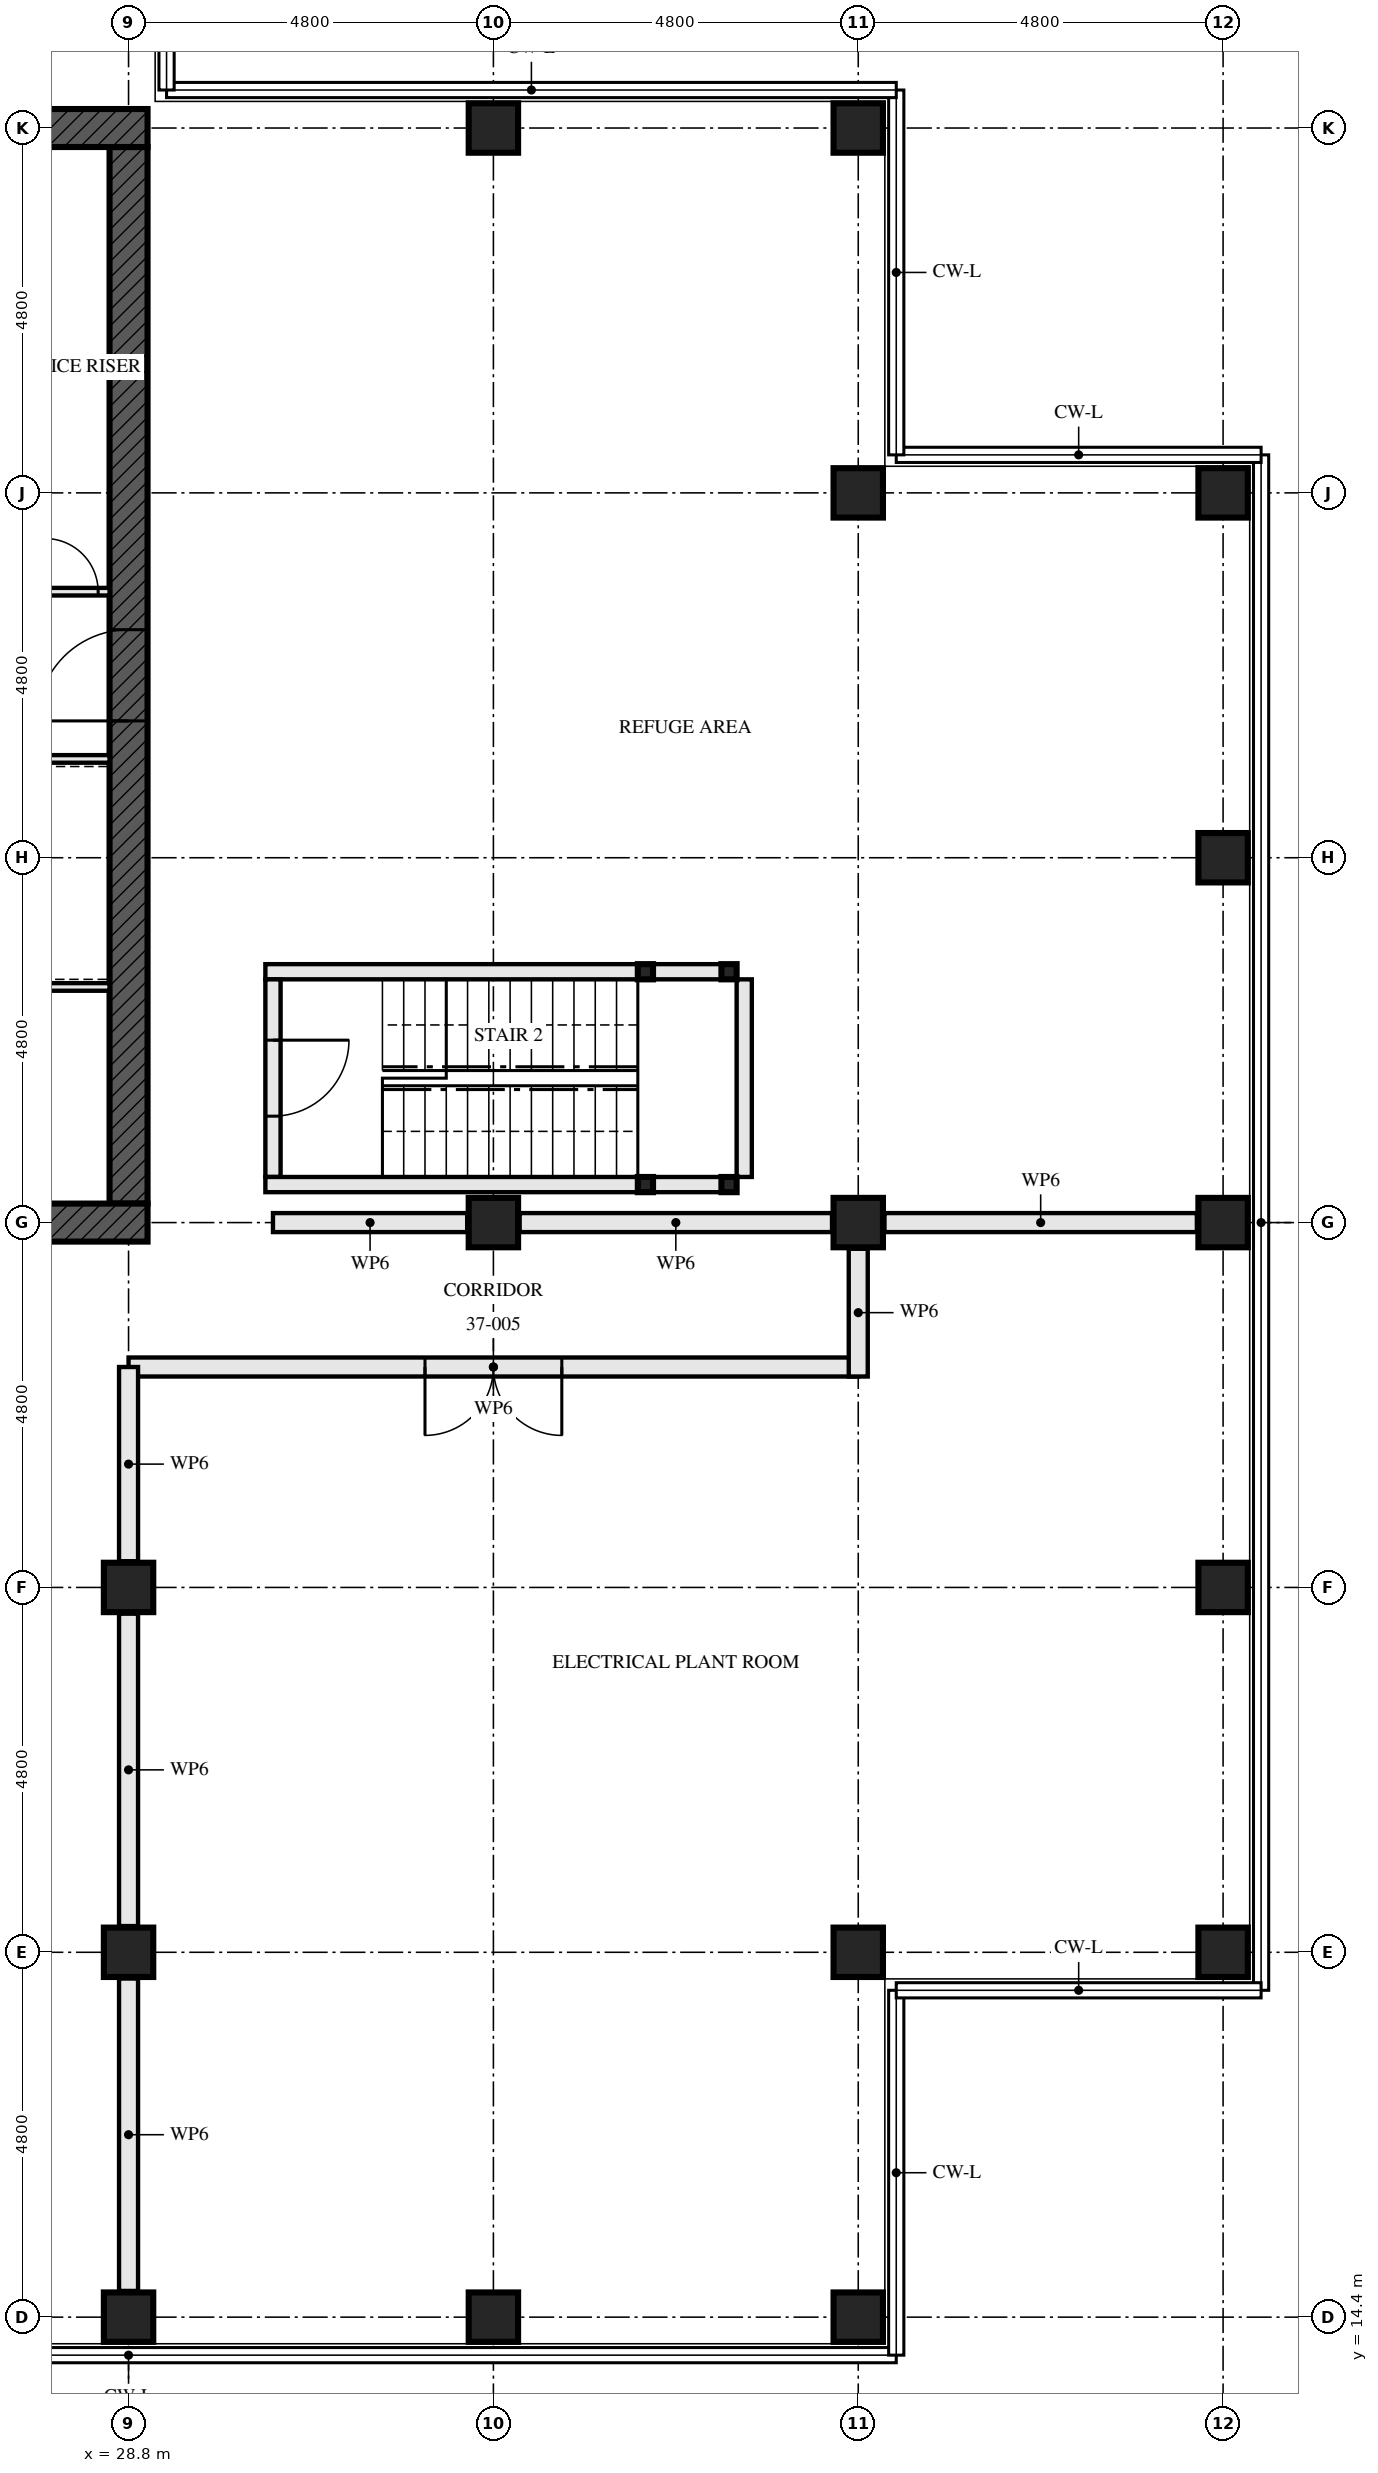
"""IFC4 building model, lengths in metres.
Left out: names, types, materials, properties, quantities, classifications, styles, units other than length and angle.
Written with IfcOpenShell. Run it as: python <this file> out.ifc"""

import sys

from ifc_helpers import new_model, si_unit, direction, frame, frame_2d, origin, origin_2d, place, context, subcontext, project, spatial, rectangle, hollow_rectangle, extrude, element, fill, save


model = new_model("IFC4")
c1 = context("Model", 3, precision=1e-05, world=origin(), true_north=direction((0.0, 1.0)))
c2 = subcontext(c1, "Body", "Model", "MODEL_VIEW")
j1 = project(units=[si_unit("LENGTHUNIT", "METRE"), si_unit("PLANEANGLEUNIT", "RADIAN")], contexts=[c1])
p1 = place(None, origin())
s1 = spatial("IfcSite", under=j1, at=p1, CompositionType="ELEMENT")
p2 = place(p1, origin())
s2 = spatial("IfcBuilding", under=s1, at=p2, CompositionType="ELEMENT")
p3 = place(p2, frame((0.0, 0.0, 136.5)))
s3 = spatial("IfcBuildingStorey", under=s2, at=p3, CompositionType="ELEMENT", Elevation=136.5)
p4 = place(p3, frame((28.8, 14.4, 0.0), z_axis=(0.0, 0.0, 1.0), x_axis=(0.0, 1.0, 0.0)))
e1 = element("IfcColumn", 1, at=p4, inside=s3, PredefinedType="COLUMN", context=c2, shape_type="SweptSolid", body=[
    extrude(hollow_rectangle(XDim=0.65, YDim=0.65, WallThickness=0.08, at=origin_2d()), origin(), (0.0, 0.0, 1.0), 4.33),
])
for number, where, z_axis, x_axis in (
    (2, (28.8, 19.2, 0.0), (0.0, 0.0, 1.0), (1.0, 0.0, 0.0)),
    (3, (28.8, 24.0, 0.0), (0.0, 0.0, 1.0), (1.0, 0.0, 0.0)),
):
    element("IfcColumn", number, at=place(p3, frame(where, z_axis=z_axis, x_axis=x_axis)), inside=s3, PredefinedType="COLUMN", context=c2, shape_type="SweptSolid", body=[
        extrude(hollow_rectangle(XDim=0.65, YDim=0.65, WallThickness=0.05, at=origin_2d()), origin(), (0.0, 0.0, 1.0), 4.5),
    ])
p5 = place(p3, frame((33.6, 14.4, 0.0), z_axis=(0.0, 0.0, 1.0), x_axis=(0.0, 1.0, 0.0)))
e4 = element("IfcColumn", 4, at=p5, inside=s3, PredefinedType="COLUMN", context=c2, shape_type="SweptSolid", body=[
    extrude(hollow_rectangle(XDim=0.65, YDim=0.65, WallThickness=0.08, at=origin_2d()), origin(), (0.0, 0.0, 1.0), 4.33),
])
p6 = place(p3, frame((33.6, 28.8, 0.0), z_axis=(0.0, 0.0, 1.0), x_axis=(0.0, 1.0, 0.0)))
e5 = element("IfcColumn", 5, at=p6, inside=s3, PredefinedType="COLUMN", context=c2, shape_type="SweptSolid", body=[
    extrude(hollow_rectangle(XDim=0.65, YDim=0.65, WallThickness=0.05, at=origin_2d()), origin(), (0.0, 0.0, 1.0), 4.5),
])
p7 = place(p3, frame((33.6, 43.2, 0.0), z_axis=(0.0, 0.0, 1.0), x_axis=(0.0, 1.0, 0.0)))
e6 = element("IfcColumn", 6, at=p7, inside=s3, PredefinedType="COLUMN", context=c2, shape_type="SweptSolid", body=[
    extrude(hollow_rectangle(XDim=0.65, YDim=0.65, WallThickness=0.08, at=origin_2d()), origin(), (0.0, 0.0, 1.0), 4.5),
])
for number, where, z_axis, x_axis in (
    (7, (38.4, 14.4, 0.0), (0.0, 0.0, 1.0), (0.0, 1.0, 0.0)),
    (8, (38.4, 19.2, 0.0), (0.0, 0.0, 1.0), (0.0, 1.0, 0.0)),
):
    element("IfcColumn", number, at=place(p3, frame(where, z_axis=z_axis, x_axis=x_axis)), inside=s3, PredefinedType="COLUMN", context=c2, shape_type="SweptSolid", body=[
        extrude(hollow_rectangle(XDim=0.65, YDim=0.65, WallThickness=0.08, at=origin_2d()), origin(), (0.0, 0.0, 1.0), 4.33),
    ])
p8 = place(p3, frame((38.4, 28.8, 0.0), z_axis=(0.0, 0.0, 1.0), x_axis=(0.0, 1.0, 0.0)))
e9 = element("IfcColumn", 9, at=p8, inside=s3, PredefinedType="COLUMN", context=c2, shape_type="SweptSolid", body=[
    extrude(hollow_rectangle(XDim=0.65, YDim=0.65, WallThickness=0.05, at=origin_2d()), origin(), (0.0, 0.0, 1.0), 4.5),
])
for number, where, z_axis, x_axis in (
    (10, (38.4, 38.4, 0.0), (0.0, 0.0, 1.0), (0.0, 1.0, 0.0)),
    (11, (38.4, 43.2, 0.0), (0.0, 0.0, 1.0), (0.0, 1.0, 0.0)),
):
    element("IfcColumn", number, at=place(p3, frame(where, z_axis=z_axis, x_axis=x_axis)), inside=s3, PredefinedType="COLUMN", context=c2, shape_type="SweptSolid", body=[
        extrude(hollow_rectangle(XDim=0.65, YDim=0.65, WallThickness=0.08, at=origin_2d()), origin(), (0.0, 0.0, 1.0), 4.5),
    ])
for number, where, z_axis, x_axis in (
    (12, (43.2, 19.2, 0.0), (0.0, 0.0, 1.0), (0.0, 1.0, 0.0)),
    (13, (43.2, 24.0, 0.0), (0.0, 0.0, 1.0), (1.0, 0.0, 0.0)),
    (14, (43.2, 28.8, 0.0), (0.0, 0.0, 1.0), (0.0, 1.0, 0.0)),
):
    element("IfcColumn", number, at=place(p3, frame(where, z_axis=z_axis, x_axis=x_axis)), inside=s3, PredefinedType="COLUMN", context=c2, shape_type="SweptSolid", body=[
        extrude(hollow_rectangle(XDim=0.65, YDim=0.65, WallThickness=0.08, at=origin_2d()), origin(), (0.0, 0.0, 1.0), 4.33),
    ])
for number, where, z_axis, x_axis in (
    (15, (43.2, 33.6, 0.0), (0.0, 0.0, 1.0), (1.0, 0.0, 0.0)),
    (16, (43.2, 38.4, 0.0), (0.0, 0.0, 1.0), (0.0, 1.0, 0.0)),
):
    element("IfcColumn", number, at=place(p3, frame(where, z_axis=z_axis, x_axis=x_axis)), inside=s3, PredefinedType="COLUMN", context=c2, shape_type="SweptSolid", body=[
        extrude(hollow_rectangle(XDim=0.65, YDim=0.65, WallThickness=0.08, at=origin_2d()), origin(), (0.0, 0.0, 1.0), 4.5),
    ])
p9 = place(p3, frame((14.15, 28.8, -0.25), z_axis=(0.0, 0.0, 1.0), x_axis=(1.0, 0.0, 0.0)))
e17 = element("IfcWall", 17, at=p9, inside=s3, PredefinedType="SHEAR", context=c2, shape_type="SweptSolid", body=[
    extrude(rectangle(XDim=14.9, YDim=0.5, at=frame_2d((7.45, 0.0))), origin(), (0.0, 0.0, 1.0), 4.58),
])
p10 = place(p9, frame((6.85, 0.0, 0.25)))
e18 = element("IfcOpeningElement", 18, at=p10, cuts=e17, PredefinedType="OPENING", context=c2, shape_type="SweptSolid", body=[
    extrude(rectangle(XDim=1.2, YDim=2.1, at=frame_2d((0.6, 1.05))), frame((0.0, 0.26, 0.0), z_axis=(0.0, -1.0, 0.0), x_axis=(1.0, 0.0, 0.0)), (0.0, 0.0, 1.0), 0.521),
])
p11 = place(p3, frame((29.05, 43.2, -0.25), z_axis=(0.0, 0.0, 1.0), x_axis=(-1.0, 0.0, 0.0)))
e19 = element("IfcWall", 19, at=p11, inside=s3, PredefinedType="SHEAR", context=c2, shape_type="SweptSolid", body=[
    extrude(rectangle(XDim=14.9, YDim=0.5, at=frame_2d((7.45, 0.0))), origin(), (0.0, 0.0, 1.0), 4.58),
])
p12 = place(p11, frame((6.85, 0.0, 0.25)))
e20 = element("IfcOpeningElement", 20, at=p12, cuts=e19, PredefinedType="OPENING", context=c2, shape_type="SweptSolid", body=[
    extrude(rectangle(XDim=1.2, YDim=2.1, at=frame_2d((0.6, 1.05))), frame((0.0, 0.26, 0.0), z_axis=(0.0, -1.0, 0.0), x_axis=(1.0, 0.0, 0.0)), (0.0, 0.0, 1.0), 0.521),
])
p13 = place(p3, frame((28.8, 29.05, -0.25), z_axis=(0.0, 0.0, 1.0), x_axis=(0.0, 1.0, 0.0)))
e21 = element("IfcWall", 21, at=p13, inside=s3, PredefinedType="SHEAR", context=c2, shape_type="SweptSolid", body=[
    extrude(rectangle(XDim=13.9, YDim=0.5, at=frame_2d((6.95, 0.0))), origin(), (0.0, 0.0, 1.0), 4.58),
])
p14 = place(p13, frame((6.35, 0.0, 0.25)))
e22 = element("IfcOpeningElement", 22, at=p14, cuts=e21, PredefinedType="OPENING", context=c2, shape_type="SweptSolid", body=[
    extrude(rectangle(XDim=1.2, YDim=2.1, at=frame_2d((0.6, 1.05))), frame((0.0, 0.26, 0.0), z_axis=(0.0, -1.0, 0.0), x_axis=(1.0, 0.0, 0.0)), (0.0, 0.0, 1.0), 0.521),
])
for number, where, z_axis, x_axis in (
    (23, (36.7, 29.3, 0.0), (0.0, 0.0, 1.0), (1.0, 0.0, 0.0)),
    (24, (36.7, 32.1, 0.0), (0.0, 0.0, 1.0), (1.0, 0.0, 0.0)),
    (25, (35.6, 29.3, 0.0), (0.0, 0.0, 1.0), (1.0, 0.0, 0.0)),
    (26, (35.6, 32.1, 0.0), (0.0, 0.0, 1.0), (1.0, 0.0, 0.0)),
):
    element("IfcColumn", number, at=place(p3, frame(where, z_axis=z_axis, x_axis=x_axis)), inside=s3, PredefinedType="COLUMN", context=c2, shape_type="SweptSolid", body=[
        extrude(hollow_rectangle(XDim=0.2, YDim=0.2, WallThickness=0.008, at=origin_2d()), origin(), (0.0, 0.0, 1.0), 4.33),
    ])
p15 = place(p3, frame((28.8, 26.9, 0.0), z_axis=(0.0, 0.0, 1.0), x_axis=(1.0, 0.0, 0.0)))
e27 = element("IfcWall", 27, at=p15, inside=s3, PredefinedType="SOLIDWALL", context=c2, shape_type="SweptSolid", body=[
    extrude(rectangle(XDim=9.6, YDim=0.25, at=frame_2d((4.8, 0.0))), origin(), (0.0, 0.0, 1.0), 4.33),
])
p16 = place(p15, frame((3.9, 0.0, 0.0)))
e28 = element("IfcOpeningElement", 28, at=p16, cuts=e27, PredefinedType="OPENING", context=c2, shape_type="SweptSolid", body=[
    extrude(rectangle(XDim=1.8, YDim=2.4, at=frame_2d((0.9, 1.2))), frame((0.0, 0.135, 0.0), z_axis=(0.0, -1.0, 0.0), x_axis=(1.0, 0.0, 0.0)), (0.0, 0.0, 1.0), 0.271),
])
p17 = place(p3, frame((38.4, 26.775, 0.0), z_axis=(0.0, 0.0, 1.0), x_axis=(0.0, 1.0, 0.0)))
e29 = element("IfcWall", 29, at=p17, inside=s3, PredefinedType="SOLIDWALL", context=c2, shape_type="SweptSolid", body=[
    extrude(rectangle(XDim=1.68, YDim=0.25, at=frame_2d((0.84, 0.0))), origin(), (0.0, 0.0, 1.0), 4.33),
])
p18 = place(p3, frame((36.6, 29.3, 0.0), z_axis=(0.0, 0.0, 1.0), x_axis=(-1.0, 0.0, 0.0)))
e30 = element("IfcWall", 30, at=p18, inside=s3, PredefinedType="SOLIDWALL", context=c2, shape_type="SweptSolid", body=[
    extrude(rectangle(XDim=0.9, YDim=0.2, at=frame_2d((0.45, 0.0))), origin(), (0.0, 0.0, 1.0), 3.99),
])
p19 = place(p3, frame((35.5, 29.3, 0.0), z_axis=(0.0, 0.0, 1.0), x_axis=(-1.0, 0.0, 0.0)))
e31 = element("IfcWall", 31, at=p19, inside=s3, PredefinedType="SOLIDWALL", context=c2, shape_type="SweptSolid", body=[
    extrude(rectangle(XDim=4.9, YDim=0.2, at=frame_2d((2.45, 0.0))), origin(), (0.0, 0.0, 1.0), 3.99),
])
p20 = place(p3, frame((36.6, 32.1, 0.0), z_axis=(0.0, 0.0, 1.0), x_axis=(-1.0, 0.0, 0.0)))
e32 = element("IfcWall", 32, at=p20, inside=s3, PredefinedType="SOLIDWALL", context=c2, shape_type="SweptSolid", body=[
    extrude(rectangle(XDim=0.9, YDim=0.2, at=frame_2d((0.45, 0.0))), origin(), (0.0, 0.0, 1.0), 3.99),
])
p21 = place(p3, frame((35.5, 32.1, 0.0), z_axis=(0.0, 0.0, 1.0), x_axis=(-1.0, 0.0, 0.0)))
e33 = element("IfcWall", 33, at=p21, inside=s3, PredefinedType="SOLIDWALL", context=c2, shape_type="SweptSolid", body=[
    extrude(rectangle(XDim=4.9, YDim=0.2, at=frame_2d((2.45, 0.0))), origin(), (0.0, 0.0, 1.0), 3.99),
])
p22 = place(p3, frame((36.9, 29.4, 0.0), z_axis=(0.0, 0.0, 1.0), x_axis=(0.0, 1.0, 0.0)))
e34 = element("IfcWall", 34, at=p22, inside=s3, PredefinedType="SOLIDWALL", context=c2, shape_type="SweptSolid", body=[
    extrude(rectangle(XDim=2.6, YDim=0.2, at=frame_2d((1.3, 0.0))), origin(), (0.0, 0.0, 1.0), 4.33),
])
p23 = place(p3, frame((30.7, 29.4, 0.0), z_axis=(0.0, 0.0, 1.0), x_axis=(0.0, 1.0, 0.0)))
e35 = element("IfcWall", 35, at=p23, inside=s3, PredefinedType="SOLIDWALL", context=c2, shape_type="SweptSolid", body=[
    extrude(rectangle(XDim=2.6, YDim=0.2, at=frame_2d((1.3, 0.0))), origin(), (0.0, 0.0, 1.0), 4.33),
])
p24 = place(p23, frame((0.8, 0.0, 0.0)))
e36 = element("IfcOpeningElement", 36, at=p24, cuts=e35, PredefinedType="OPENING", context=c2, shape_type="SweptSolid", body=[
    extrude(rectangle(XDim=1.0, YDim=2.1, at=frame_2d((0.5, 1.05))), frame((0.0, 0.111, 0.0), z_axis=(0.0, -1.0, 0.0), x_axis=(1.0, 0.0, 0.0)), (0.0, 0.0, 1.0), 0.221),
])
p25 = place(p3, frame((23.05, 34.9, 0.0), z_axis=(0.0, 0.0, 1.0), x_axis=(1.0, 0.0, 0.0)))
e37 = element("IfcWall", 37, at=p25, inside=s3, PredefinedType="SOLIDWALL", context=c2, shape_type="SweptSolid", body=[
    extrude(rectangle(XDim=5.5, YDim=0.1, at=frame_2d((2.75, 0.0))), origin(), (0.0, 0.0, 1.0), 4.33),
])
p26 = place(p3, frame((22.65, 37.1, 0.0), z_axis=(0.0, 0.0, 1.0), x_axis=(1.0, 0.0, 0.0)))
e38 = element("IfcWall", 38, at=p26, inside=s3, PredefinedType="SOLIDWALL", context=c2, shape_type="SweptSolid", body=[
    extrude(rectangle(XDim=5.9, YDim=0.1, at=frame_2d((2.95, 0.0))), origin(), (0.0, 0.0, 1.0), 4.33),
])
p27 = place(p26, frame((3.5, 0.0, 0.0)))
e39 = element("IfcOpeningElement", 39, at=p27, cuts=e38, PredefinedType="OPENING", context=c2, shape_type="SweptSolid", body=[
    extrude(rectangle(XDim=0.9, YDim=2.1, at=frame_2d((0.45, 1.05))), frame((0.0, 0.061, 0.0), z_axis=(0.0, -1.0, 0.0), x_axis=(1.0, 0.0, 0.0)), (0.0, 0.0, 1.0), 0.121),
])
p28 = place(p26, frame((5.05, 0.0, 0.0)))
e40 = element("IfcOpeningElement", 40, at=p28, cuts=e38, PredefinedType="OPENING", context=c2, shape_type="SweptSolid", body=[
    extrude(rectangle(XDim=0.7, YDim=2.1, at=frame_2d((0.35, 1.05))), frame((0.0, 0.061, 0.0), z_axis=(0.0, -1.0, 0.0), x_axis=(1.0, 0.0, 0.0)), (0.0, 0.0, 1.0), 0.121),
])
p29 = place(p3, frame((23.15, 31.9, 0.0), z_axis=(0.0, 0.0, 1.0), x_axis=(1.0, 0.0, 0.0)))
e41 = element("IfcWall", 41, at=p29, inside=s3, PredefinedType="SOLIDWALL", context=c2, shape_type="SweptSolid", body=[
    extrude(rectangle(XDim=5.4, YDim=0.1, at=frame_2d((2.7, 0.0))), origin(), (0.0, 0.0, 1.0), 4.33),
])
p30 = place(p3, frame((28.8, 14.745, 0.0), z_axis=(0.0, 0.0, 1.0), x_axis=(0.0, 1.0, 0.0)))
e42 = element("IfcWall", 42, at=p30, inside=s3, PredefinedType="SOLIDWALL", context=c2, shape_type="SweptSolid", body=[
    extrude(rectangle(XDim=4.11, YDim=0.25, at=frame_2d((2.055, 0.0))), origin(), (0.0, 0.0, 1.0), 2.82),
])
p31 = place(p3, frame((28.8, 19.545, 0.0), z_axis=(0.0, 0.0, 1.0), x_axis=(0.0, 1.0, 0.0)))
e43 = element("IfcWall", 43, at=p31, inside=s3, PredefinedType="SOLIDWALL", context=c2, shape_type="SweptSolid", body=[
    extrude(rectangle(XDim=4.11, YDim=0.25, at=frame_2d((2.055, 0.0))), origin(), (0.0, 0.0, 1.0), 2.82),
])
p32 = place(p3, frame((28.8, 24.345, 0.0), z_axis=(0.0, 0.0, 1.0), x_axis=(0.0, 1.0, 0.0)))
e44 = element("IfcWall", 44, at=p32, inside=s3, PredefinedType="SOLIDWALL", context=c2, shape_type="SweptSolid", body=[
    extrude(rectangle(XDim=2.555, YDim=0.25, at=frame_2d((1.277, 0.0))), origin(), (0.0, 0.0, 1.0), 2.82),
])
for number, where, z_axis, x_axis in (
    (45, (42.855, 28.8, 0.0), (0.0, 0.0, 1.0), (-1.0, 0.0, 0.0)),
    (46, (38.055, 28.8, 0.0), (0.0, 0.0, 1.0), (-1.0, 0.0, 0.0)),
):
    element("IfcWall", number, at=place(p3, frame(where, z_axis=z_axis, x_axis=x_axis)), inside=s3, PredefinedType="SOLIDWALL", context=c2, shape_type="SweptSolid", body=[
        extrude(rectangle(XDim=4.11, YDim=0.25, at=frame_2d((2.055, 0.0))), origin(), (0.0, 0.0, 1.0), 3.12),
    ])
p33 = place(p3, frame((33.255, 28.8, 0.0), z_axis=(0.0, 0.0, 1.0), x_axis=(-1.0, 0.0, 0.0)))
e47 = element("IfcWall", 47, at=p33, inside=s3, PredefinedType="SOLIDWALL", context=c2, shape_type="SweptSolid", body=[
    extrude(rectangle(XDim=2.555, YDim=0.25, at=frame_2d((1.277, 0.0))), origin(), (0.0, 0.0, 1.0), 3.12),
])
p34 = place(p16, frame((1.8, 0.0, 0.0), z_axis=(0.0, 0.0, 1.0), x_axis=(-1.0, 0.0, 0.0)))
e48 = element("IfcDoor", 48, at=p34, inside=s3, OperationType="DOUBLE_DOOR_SINGLE_SWING", PredefinedType="DOOR", context=c2, shape_type="SweptSolid", body=[
    extrude(rectangle(XDim=1.8, YDim=2.4, at=frame_2d((0.9, 1.2))), frame((0.0, 0.032, 0.0), z_axis=(0.0, -1.0, 0.0), x_axis=(1.0, 0.0, 0.0)), (0.0, 0.0, 1.0), 0.064),
])
fill(e28, e48)
p35 = place(p24, frame((1.0, 0.0, 0.0), z_axis=(0.0, 0.0, 1.0), x_axis=(-1.0, 0.0, 0.0)))
e49 = element("IfcDoor", 49, at=p35, inside=s3, OperationType="SINGLE_SWING_RIGHT", PredefinedType="DOOR", context=c2, shape_type="SweptSolid", body=[
    extrude(rectangle(XDim=1.0, YDim=2.1, at=frame_2d((0.5, 1.05))), frame((0.0, 0.032, 0.0), z_axis=(0.0, -1.0, 0.0), x_axis=(1.0, 0.0, 0.0)), (0.0, 0.0, 1.0), 0.064),
])
fill(e36, e49)
p36 = place(p28, origin())
e50 = element("IfcDoor", 50, at=p36, inside=s3, OperationType="SINGLE_SWING_RIGHT", PredefinedType="DOOR", context=c2, shape_type="SweptSolid", body=[
    extrude(rectangle(XDim=0.7, YDim=2.1, at=frame_2d((0.35, 1.05))), frame((0.0, 0.027, 0.0), z_axis=(0.0, -1.0, 0.0), x_axis=(1.0, 0.0, 0.0)), (0.0, 0.0, 1.0), 0.054),
])
fill(e40, e50)
p37 = place(p14, origin())
e51 = element("IfcDoor", 51, at=p37, inside=s3, OperationType="SINGLE_SWING_LEFT", PredefinedType="DOOR", context=c2, shape_type="SweptSolid", body=[
    extrude(rectangle(XDim=1.2, YDim=2.1, at=frame_2d((0.6, 1.05))), frame((0.0, 0.027, 0.0), z_axis=(0.0, -1.0, 0.0), x_axis=(1.0, 0.0, 0.0)), (0.0, 0.0, 1.0), 0.054),
])
fill(e22, e51)
save(model, sys.argv[1])
